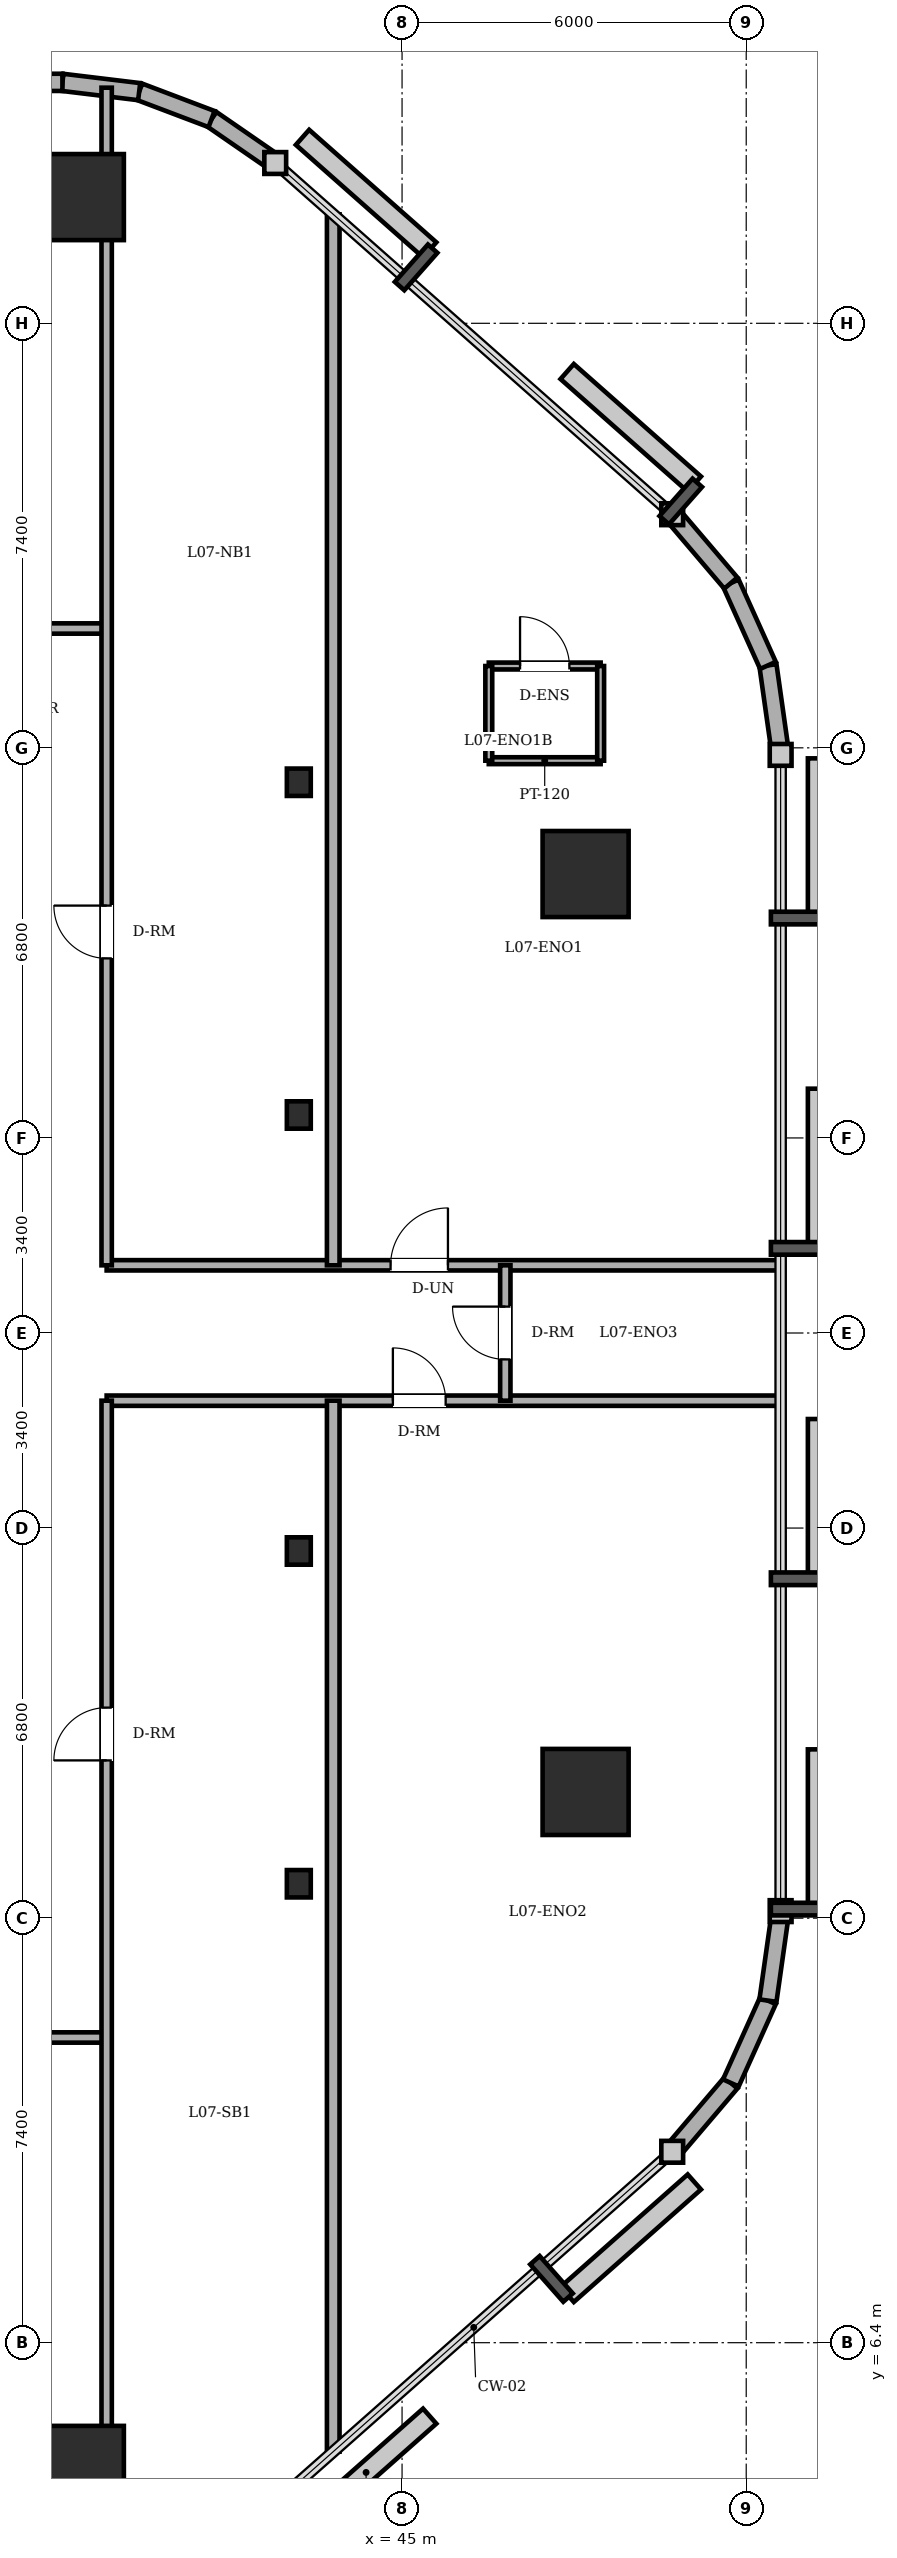
"""IFC4 building model, lengths in metres.
Left out: names, types, materials, properties, quantities, classifications, styles, units other than length and angle.
Written with IfcOpenShell. Run it as: python <this file> out.ifc"""

import sys

from ifc_helpers import new_model, si_unit, direction, frame, frame_2d, origin, origin_2d, place, context, subcontext, project, spatial, rectangle, circle, i_section, extrude, element, fill, save


model = new_model("IFC4")
c1 = context("Model", 3, precision=1e-05, world=origin(), true_north=direction((0.0, 1.0)))
c2 = subcontext(c1, "Body", "Model", "MODEL_VIEW")
j1 = project(units=[si_unit("LENGTHUNIT", "METRE"), si_unit("PLANEANGLEUNIT", "RADIAN")], contexts=[c1])
p1 = place(None, origin())
s1 = spatial("IfcSite", under=j1, at=p1, CompositionType="ELEMENT")
p2 = place(p1, origin())
s2 = spatial("IfcBuilding", under=s1, at=p2, CompositionType="ELEMENT")
p3 = place(p2, frame((0.0, 0.0, 28.8)))
s3 = spatial("IfcBuildingStorey", under=s2, at=p3, CompositionType="ELEMENT", Elevation=28.8)
for number, where, z_axis, x_axis in (
    (1, (39.4, 4.2, 0.0), (0.0, 0.0, 1.0), (1.0, 0.0, 0.0)),
    (2, (48.2, 16.0, 0.0), (0.0, 0.0, 1.0), (1.0, 0.0, 0.0)),
    (3, (48.2, 32.0, 0.0), (0.0, 0.0, 1.0), (1.0, 0.0, 0.0)),
    (4, (39.4, 43.8, 0.0), (0.0, 0.0, 1.0), (1.0, 0.0, 0.0)),
):
    element("IfcColumn", number, at=place(p3, frame(where, z_axis=z_axis, x_axis=x_axis)), inside=s3, PredefinedType="COLUMN", context=c2, shape_type="SweptSolid", body=[
        extrude(circle(Radius=0.75, at=origin_2d()), origin(), (0.0, 0.0, 1.0), 3.6),
    ])
for number, where, z_axis, x_axis in (
    (5, (43.2, 14.4, 0.0), (0.0, 0.0, 1.0), (1.0, 0.0, 0.0)),
    (6, (43.2, 20.2, 0.0), (0.0, 0.0, 1.0), (1.0, 0.0, 0.0)),
    (7, (43.2, 27.8, 0.0), (0.0, 0.0, 1.0), (1.0, 0.0, 0.0)),
    (8, (43.2, 33.6, 0.0), (0.0, 0.0, 1.0), (1.0, 0.0, 0.0)),
):
    element("IfcColumn", number, at=place(p3, frame(where, z_axis=z_axis, x_axis=x_axis)), inside=s3, PredefinedType="COLUMN", context=c2, shape_type="SweptSolid", body=[
        extrude(i_section(OverallWidth=0.417, OverallDepth=0.477, WebThickness=0.036, FlangeThickness=0.057, FilletRadius=0.015, at=origin_2d()), origin(), (0.0, 0.0, 1.0), 3.6),
    ])
p4 = place(p3, frame((49.71, 9.728, 0.0), z_axis=(0.0, 0.0, 1.0), x_axis=(0.648389989909, 0.7613083613, 0.0)))
e9 = element("IfcWall", 9, at=p4, inside=s3, PredefinedType="SOLIDWALL", context=c2, shape_type="SweptSolid", body=[
    extrude(rectangle(XDim=1.576, YDim=0.3, at=frame_2d((0.788, 0.0))), origin(), (0.0, 0.0, 1.0), 3.4),
])
p5 = place(p3, frame((50.732, 10.928, 0.0), z_axis=(0.0, 0.0, 1.0), x_axis=(0.410996558744, 0.911636895206, 0.0)))
e10 = element("IfcWall", 10, at=p5, inside=s3, PredefinedType="SOLIDWALL", context=c2, shape_type="SweptSolid", body=[
    extrude(rectangle(XDim=1.574, YDim=0.3, at=frame_2d((0.787, 0.0))), origin(), (0.0, 0.0, 1.0), 3.4),
])
for number, where, z_axis, x_axis in (
    (11, (51.379, 12.363, 0.0), (0.0, 0.0, 1.0), (0.14, 0.99, 0.0)),
    (12, (51.6, 34.077, 0.0), (0.0, 0.0, 1.0), (-0.14, 0.99, 0.0)),
):
    element("IfcWall", number, at=place(p3, frame(where, z_axis=z_axis, x_axis=x_axis)), inside=s3, PredefinedType="SOLIDWALL", context=c2, shape_type="SweptSolid", body=[
        extrude(rectangle(XDim=1.576, YDim=0.3, at=frame_2d((0.788, 0.0))), origin(), (0.0, 0.0, 1.0), 3.4),
    ])
p6 = place(p3, frame((51.379, 35.637, 0.0), z_axis=(0.0, 0.0, 1.0), x_axis=(-0.410996558744, 0.911636895206, 0.0)))
e13 = element("IfcWall", 13, at=p6, inside=s3, PredefinedType="SOLIDWALL", context=c2, shape_type="SweptSolid", body=[
    extrude(rectangle(XDim=1.574, YDim=0.3, at=frame_2d((0.787, 0.0))), origin(), (0.0, 0.0, 1.0), 3.4),
])
p7 = place(p3, frame((50.732, 37.072, 0.0), z_axis=(0.0, 0.0, 1.0), x_axis=(-0.648389989909, 0.7613083613, 0.0)))
e14 = element("IfcWall", 14, at=p7, inside=s3, PredefinedType="SOLIDWALL", context=c2, shape_type="SweptSolid", body=[
    extrude(rectangle(XDim=1.576, YDim=0.3, at=frame_2d((0.788, 0.0))), origin(), (0.0, 0.0, 1.0), 3.4),
])
p8 = place(p3, frame((42.789, 44.394, 0.0), z_axis=(0.0, 0.0, 1.0), x_axis=(-0.823116500192, 0.567872544777, 0.0)))
e15 = element("IfcWall", 15, at=p8, inside=s3, PredefinedType="SOLIDWALL", context=c2, shape_type="SweptSolid", body=[
    extrude(rectangle(XDim=1.349, YDim=0.3, at=frame_2d((0.674, 0.0))), origin(), (0.0, 0.0, 1.0), 3.4),
])
p9 = place(p3, frame((41.679, 45.16, 0.0), z_axis=(0.0, 0.0, 1.0), x_axis=(-0.935156721165, 0.354234254216, 0.0)))
e16 = element("IfcWall", 16, at=p9, inside=s3, PredefinedType="SOLIDWALL", context=c2, shape_type="SweptSolid", body=[
    extrude(rectangle(XDim=1.349, YDim=0.3, at=frame_2d((0.675, 0.0))), origin(), (0.0, 0.0, 1.0), 3.4),
])
p10 = place(p3, frame((40.417, 45.638, 0.0), z_axis=(0.0, 0.0, 1.0), x_axis=(-0.992739027259, 0.120288086515, 0.0)))
e17 = element("IfcWall", 17, at=p10, inside=s3, PredefinedType="SOLIDWALL", context=c2, shape_type="SweptSolid", body=[
    extrude(rectangle(XDim=1.348, YDim=0.3, at=frame_2d((0.674, 0.0))), origin(), (0.0, 0.0, 1.0), 3.4),
])
p11 = place(p3, frame((39.079, 45.8, 0.0), z_axis=(0.0, 0.0, 1.0), x_axis=(-1.0, 0.0, 0.0)))
e18 = element("IfcWall", 18, at=p11, inside=s3, PredefinedType="SOLIDWALL", context=c2, shape_type="SweptSolid", body=[
    extrude(rectangle(XDim=30.079, YDim=0.3, at=frame_2d((15.04, 0.0))), origin(), (0.0, 0.0, 1.0), 3.4),
])
p12 = place(p11, frame((25.279, 0.0, 0.0)))
e19 = element("IfcOpeningElement", 19, at=p12, cuts=e18, PredefinedType="OPENING", context=c2, shape_type="SweptSolid", body=[
    extrude(rectangle(XDim=0.95, YDim=2.2, at=frame_2d((0.475, 1.1))), frame((0.0, 0.16, 0.0), z_axis=(0.0, -1.0, 0.0), x_axis=(1.0, 0.0, 0.0)), (0.0, 0.0, 1.0), 0.32),
])
p13 = place(p11, frame((2.226, 0.0, 0.85)))
e20 = element("IfcOpeningElement", 20, at=p13, cuts=e18, PredefinedType="OPENING", context=c2, shape_type="SweptSolid", body=[
    extrude(rectangle(XDim=1.8, YDim=1.55, at=frame_2d((0.9, 0.775))), frame((0.0, 0.16, 0.0), z_axis=(0.0, -1.0, 0.0), x_axis=(1.0, 0.0, 0.0)), (0.0, 0.0, 1.0), 0.32),
])
p14 = place(p11, frame((5.003, 0.0, 0.85)))
e21 = element("IfcOpeningElement", 21, at=p14, cuts=e18, PredefinedType="OPENING", context=c2, shape_type="SweptSolid", body=[
    extrude(rectangle(XDim=1.8, YDim=1.55, at=frame_2d((0.9, 0.775))), frame((0.0, 0.16, 0.0), z_axis=(0.0, -1.0, 0.0), x_axis=(1.0, 0.0, 0.0)), (0.0, 0.0, 1.0), 0.32),
])
p15 = place(p11, frame((10.179, 0.0, 0.85)))
e22 = element("IfcOpeningElement", 22, at=p15, cuts=e18, PredefinedType="OPENING", context=c2, shape_type="SweptSolid", body=[
    extrude(rectangle(XDim=1.8, YDim=1.55, at=frame_2d((0.9, 0.775))), frame((0.0, 0.16, 0.0), z_axis=(0.0, -1.0, 0.0), x_axis=(1.0, 0.0, 0.0)), (0.0, 0.0, 1.0), 0.32),
])
p16 = place(p11, frame((12.579, 0.0, 0.85)))
e23 = element("IfcOpeningElement", 23, at=p16, cuts=e18, PredefinedType="OPENING", context=c2, shape_type="SweptSolid", body=[
    extrude(rectangle(XDim=1.8, YDim=1.55, at=frame_2d((0.9, 0.775))), frame((0.0, 0.16, 0.0), z_axis=(0.0, -1.0, 0.0), x_axis=(1.0, 0.0, 0.0)), (0.0, 0.0, 1.0), 0.32),
])
p17 = place(p11, frame((19.007, 0.0, 0.85)))
e24 = element("IfcOpeningElement", 24, at=p17, cuts=e18, PredefinedType="OPENING", context=c2, shape_type="SweptSolid", body=[
    extrude(rectangle(XDim=1.8, YDim=1.55, at=frame_2d((0.9, 0.775))), frame((0.0, 0.16, 0.0), z_axis=(0.0, -1.0, 0.0), x_axis=(1.0, 0.0, 0.0)), (0.0, 0.0, 1.0), 0.32),
])
p18 = place(p11, frame((23.034, 0.0, 0.85)))
e25 = element("IfcOpeningElement", 25, at=p18, cuts=e18, PredefinedType="OPENING", context=c2, shape_type="SweptSolid", body=[
    extrude(rectangle(XDim=1.8, YDim=1.55, at=frame_2d((0.9, 0.775))), frame((0.0, 0.16, 0.0), z_axis=(0.0, -1.0, 0.0), x_axis=(1.0, 0.0, 0.0)), (0.0, 0.0, 1.0), 0.32),
])
p19 = place(p3, frame((46.512, 35.626, 0.0), z_axis=(0.0, 0.0, 1.0), x_axis=(1.0, 0.0, 0.0)))
e26 = element("IfcWall", 26, at=p19, inside=s3, PredefinedType="PARTITIONING", context=c2, shape_type="SweptSolid", body=[
    extrude(rectangle(XDim=1.95, YDim=0.12, at=frame_2d((0.975, 0.0))), origin(), (0.0, 0.0, 1.0), 3.4),
])
p20 = place(p19, frame((0.545, 0.0, 0.0)))
e27 = element("IfcOpeningElement", 27, at=p20, cuts=e26, PredefinedType="OPENING", context=c2, shape_type="SweptSolid", body=[
    extrude(rectangle(XDim=0.86, YDim=2.1, at=frame_2d((0.43, 1.05))), frame((0.0, 0.07, 0.0), z_axis=(0.0, -1.0, 0.0), x_axis=(1.0, 0.0, 0.0)), (0.0, 0.0, 1.0), 0.14),
])
p21 = place(p3, frame((48.462, 33.976, 0.0), z_axis=(0.0, 0.0, 1.0), x_axis=(-1.0, 0.0, 0.0)))
e28 = element("IfcWall", 28, at=p21, inside=s3, PredefinedType="PARTITIONING", context=c2, shape_type="SweptSolid", body=[
    extrude(rectangle(XDim=1.95, YDim=0.12, at=frame_2d((0.975, 0.0))), origin(), (0.0, 0.0, 1.0), 3.4),
])
for number, where, z_axis, x_axis in (
    (29, (46.512, 35.626, 0.0), (0.0, 0.0, 1.0), (0.0, -1.0, 0.0)),
    (30, (48.462, 33.976, 0.0), (0.0, 0.0, 1.0), (0.0, 1.0, 0.0)),
):
    element("IfcWall", number, at=place(p3, frame(where, z_axis=z_axis, x_axis=x_axis)), inside=s3, PredefinedType="PARTITIONING", context=c2, shape_type="SweptSolid", body=[
        extrude(rectangle(XDim=1.65, YDim=0.12, at=frame_2d((0.825, 0.0))), origin(), (0.0, 0.0, 1.0), 3.4),
    ])
p22 = place(p3, frame((3.4, 11.72, 0.0), z_axis=(0.0, 0.0, 1.0), x_axis=(1.0, 0.0, 0.0)))
e31 = element("IfcWall", 31, at=p22, inside=s3, PredefinedType="PARTITIONING", context=c2, shape_type="SweptSolid", body=[
    extrude(rectangle(XDim=36.45, YDim=0.18, at=frame_2d((18.225, 0.0))), origin(), (0.0, 0.0, 1.0), 3.4),
])
p23 = place(p22, frame((21.24, 0.0, 0.0)))
e32 = element("IfcOpeningElement", 32, at=p23, cuts=e31, PredefinedType="OPENING", context=c2, shape_type="SweptSolid", body=[
    extrude(rectangle(XDim=0.92, YDim=2.1, at=frame_2d((0.46, 1.05))), frame((0.0, 0.1, 0.0), z_axis=(0.0, -1.0, 0.0), x_axis=(1.0, 0.0, 0.0)), (0.0, 0.0, 1.0), 0.2),
])
p24 = place(p22, frame((4.925, 0.0, 0.0)))
e33 = element("IfcOpeningElement", 33, at=p24, cuts=e31, PredefinedType="OPENING", context=c2, shape_type="SweptSolid", body=[
    extrude(rectangle(XDim=1.0, YDim=2.15, at=frame_2d((0.5, 1.075))), frame((0.0, 0.1, 0.0), z_axis=(0.0, -1.0, 0.0), x_axis=(1.0, 0.0, 0.0)), (0.0, 0.0, 1.0), 0.2),
])
p25 = place(p22, frame((13.525, 0.0, 0.0)))
e34 = element("IfcOpeningElement", 34, at=p25, cuts=e31, PredefinedType="OPENING", context=c2, shape_type="SweptSolid", body=[
    extrude(rectangle(XDim=1.0, YDim=2.15, at=frame_2d((0.5, 1.075))), frame((0.0, 0.1, 0.0), z_axis=(0.0, -1.0, 0.0), x_axis=(1.0, 0.0, 0.0)), (0.0, 0.0, 1.0), 0.2),
])
p26 = place(p22, frame((29.305, 0.0, 0.0)))
e35 = element("IfcOpeningElement", 35, at=p26, cuts=e31, PredefinedType="OPENING", context=c2, shape_type="SweptSolid", body=[
    extrude(rectangle(XDim=0.92, YDim=2.1, at=frame_2d((0.46, 1.05))), frame((0.0, 0.1, 0.0), z_axis=(0.0, -1.0, 0.0), x_axis=(1.0, 0.0, 0.0)), (0.0, 0.0, 1.0), 0.2),
])
p27 = place(p3, frame((39.85, 22.82, 0.0), z_axis=(0.0, 0.0, 1.0), x_axis=(1.0, 0.0, 0.0)))
e36 = element("IfcWall", 36, at=p27, inside=s3, PredefinedType="PARTITIONING", context=c2, shape_type="SweptSolid", body=[
    extrude(rectangle(XDim=11.75, YDim=0.18, at=frame_2d((5.875, 0.0))), origin(), (0.0, 0.0, 1.0), 3.4),
])
p28 = place(p27, frame((4.99, 0.0, 0.0)))
e37 = element("IfcOpeningElement", 37, at=p28, cuts=e36, PredefinedType="OPENING", context=c2, shape_type="SweptSolid", body=[
    extrude(rectangle(XDim=0.92, YDim=2.1, at=frame_2d((0.46, 1.05))), frame((0.0, 0.1, 0.0), z_axis=(0.0, -1.0, 0.0), x_axis=(1.0, 0.0, 0.0)), (0.0, 0.0, 1.0), 0.2),
])
p29 = place(p3, frame((39.85, 25.18, 0.0), z_axis=(0.0, 0.0, 1.0), x_axis=(1.0, 0.0, 0.0)))
e38 = element("IfcWall", 38, at=p29, inside=s3, PredefinedType="PARTITIONING", context=c2, shape_type="SweptSolid", body=[
    extrude(rectangle(XDim=11.75, YDim=0.18, at=frame_2d((5.875, 0.0))), origin(), (0.0, 0.0, 1.0), 3.4),
])
p30 = place(p29, frame((4.95, 0.0, 0.0)))
e39 = element("IfcOpeningElement", 39, at=p30, cuts=e38, PredefinedType="OPENING", context=c2, shape_type="SweptSolid", body=[
    extrude(rectangle(XDim=1.0, YDim=2.15, at=frame_2d((0.5, 1.075))), frame((0.0, 0.1, 0.0), z_axis=(0.0, -1.0, 0.0), x_axis=(1.0, 0.0, 0.0)), (0.0, 0.0, 1.0), 0.2),
])
p31 = place(p3, frame((3.4, 36.28, 0.0), z_axis=(0.0, 0.0, 1.0), x_axis=(1.0, 0.0, 0.0)))
e40 = element("IfcWall", 40, at=p31, inside=s3, PredefinedType="PARTITIONING", context=c2, shape_type="SweptSolid", body=[
    extrude(rectangle(XDim=36.45, YDim=0.18, at=frame_2d((18.225, 0.0))), origin(), (0.0, 0.0, 1.0), 3.4),
])
p32 = place(p31, frame((21.05, 0.0, 0.0)))
e41 = element("IfcOpeningElement", 41, at=p32, cuts=e40, PredefinedType="OPENING", context=c2, shape_type="SweptSolid", body=[
    extrude(rectangle(XDim=0.9, YDim=2.1, at=frame_2d((0.45, 1.05))), frame((0.0, 0.1, 0.0), z_axis=(0.0, -1.0, 0.0), x_axis=(1.0, 0.0, 0.0)), (0.0, 0.0, 1.0), 0.2),
])
p33 = place(p31, frame((24.67, 0.0, 0.0)))
e42 = element("IfcOpeningElement", 42, at=p33, cuts=e40, PredefinedType="OPENING", context=c2, shape_type="SweptSolid", body=[
    extrude(rectangle(XDim=0.86, YDim=2.1, at=frame_2d((0.43, 1.05))), frame((0.0, 0.1, 0.0), z_axis=(0.0, -1.0, 0.0), x_axis=(1.0, 0.0, 0.0)), (0.0, 0.0, 1.0), 0.2),
])
p34 = place(p31, frame((4.659, 0.0, 0.0)))
e43 = element("IfcOpeningElement", 43, at=p34, cuts=e40, PredefinedType="OPENING", context=c2, shape_type="SweptSolid", body=[
    extrude(rectangle(XDim=1.0, YDim=2.15, at=frame_2d((0.5, 1.075))), frame((0.0, 0.1, 0.0), z_axis=(0.0, -1.0, 0.0), x_axis=(1.0, 0.0, 0.0)), (0.0, 0.0, 1.0), 0.2),
])
p35 = place(p31, frame((13.258, 0.0, 0.0)))
e44 = element("IfcOpeningElement", 44, at=p35, cuts=e40, PredefinedType="OPENING", context=c2, shape_type="SweptSolid", body=[
    extrude(rectangle(XDim=1.0, YDim=2.15, at=frame_2d((0.5, 1.075))), frame((0.0, 0.1, 0.0), z_axis=(0.0, -1.0, 0.0), x_axis=(1.0, 0.0, 0.0)), (0.0, 0.0, 1.0), 0.2),
])
p36 = place(p31, frame((30.965, 0.0, 0.0)))
e45 = element("IfcOpeningElement", 45, at=p36, cuts=e40, PredefinedType="OPENING", context=c2, shape_type="SweptSolid", body=[
    extrude(rectangle(XDim=1.0, YDim=2.15, at=frame_2d((0.5, 1.075))), frame((0.0, 0.1, 0.0), z_axis=(0.0, -1.0, 0.0), x_axis=(1.0, 0.0, 0.0)), (0.0, 0.0, 1.0), 0.2),
])
p37 = place(p3, frame((39.85, 2.293, 0.0), z_axis=(0.0, 0.0, 1.0), x_axis=(0.0, 1.0, 0.0)))
e46 = element("IfcWall", 46, at=p37, inside=s3, PredefinedType="PARTITIONING", context=c2, shape_type="SweptSolid", body=[
    extrude(rectangle(XDim=20.527, YDim=0.18, at=frame_2d((10.264, 0.0))), origin(), (0.0, 0.0, 1.0), 2.782),
])
p38 = place(p37, frame((14.257, 0.0, 0.0)))
e47 = element("IfcOpeningElement", 47, at=p38, cuts=e46, PredefinedType="OPENING", context=c2, shape_type="SweptSolid", body=[
    extrude(rectangle(XDim=0.92, YDim=2.1, at=frame_2d((0.46, 1.05))), frame((0.0, 0.1, 0.0), z_axis=(0.0, -1.0, 0.0), x_axis=(1.0, 0.0, 0.0)), (0.0, 0.0, 1.0), 0.2),
])
p39 = place(p3, frame((39.85, 25.18, 0.0), z_axis=(0.0, 0.0, 1.0), x_axis=(0.0, 1.0, 0.0)))
e48 = element("IfcWall", 48, at=p39, inside=s3, PredefinedType="PARTITIONING", context=c2, shape_type="SweptSolid", body=[
    extrude(rectangle(XDim=20.527, YDim=0.18, at=frame_2d((10.264, 0.0))), origin(), (0.0, 0.0, 1.0), 2.782),
])
p40 = place(p39, frame((5.35, 0.0, 0.0)))
e49 = element("IfcOpeningElement", 49, at=p40, cuts=e48, PredefinedType="OPENING", context=c2, shape_type="SweptSolid", body=[
    extrude(rectangle(XDim=0.92, YDim=2.1, at=frame_2d((0.46, 1.05))), frame((0.0, 0.1, 0.0), z_axis=(0.0, -1.0, 0.0), x_axis=(1.0, 0.0, 0.0)), (0.0, 0.0, 1.0), 0.2),
])
for number, where, z_axis, x_axis in (
    (50, (43.8, 4.5, 0.0), (0.0, 0.0, 1.0), (0.0, 1.0, 0.0)),
    (51, (43.8, 25.18, 0.0), (0.0, 0.0, 1.0), (0.0, 1.0, 0.0)),
):
    element("IfcWall", number, at=place(p3, frame(where, z_axis=z_axis, x_axis=x_axis)), inside=s3, PredefinedType="PARTITIONING", context=c2, shape_type="SweptSolid", body=[
        extrude(rectangle(XDim=18.32, YDim=0.22, at=frame_2d((9.16, 0.0))), origin(), (0.0, 0.0, 1.0), 3.4),
    ])
p41 = place(p3, frame((46.8, 22.82, 0.0), z_axis=(0.0, 0.0, 1.0), x_axis=(0.0, 1.0, 0.0)))
e52 = element("IfcWall", 52, at=p41, inside=s3, PredefinedType="PARTITIONING", context=c2, shape_type="SweptSolid", body=[
    extrude(rectangle(XDim=2.36, YDim=0.18, at=frame_2d((1.18, 0.0))), origin(), (0.0, 0.0, 1.0), 3.4),
])
p42 = place(p41, frame((0.72, 0.0, 0.0)))
e53 = element("IfcOpeningElement", 53, at=p42, cuts=e52, PredefinedType="OPENING", context=c2, shape_type="SweptSolid", body=[
    extrude(rectangle(XDim=0.92, YDim=2.1, at=frame_2d((0.46, 1.05))), frame((0.0, 0.1, 0.0), z_axis=(0.0, -1.0, 0.0), x_axis=(1.0, 0.0, 0.0)), (0.0, 0.0, 1.0), 0.2),
])
p43 = place(p20, origin())
e54 = element("IfcDoor", 54, at=p43, inside=s3, OperationType="SINGLE_SWING_LEFT", PredefinedType="DOOR", context=c2, shape_type="SweptSolid", body=[
    extrude(rectangle(XDim=0.86, YDim=2.1, at=frame_2d((0.43, 1.05))), frame((0.0, 0.025, 0.0), z_axis=(0.0, -1.0, 0.0), x_axis=(1.0, 0.0, 0.0)), (0.0, 0.0, 1.0), 0.05),
])
fill(e27, e54)
p44 = place(p40, origin())
e55 = element("IfcDoor", 55, at=p44, inside=s3, OperationType="SINGLE_SWING_RIGHT", PredefinedType="DOOR", context=c2, shape_type="SweptSolid", body=[
    extrude(rectangle(XDim=0.92, YDim=2.1, at=frame_2d((0.46, 1.05))), frame((0.0, 0.025, 0.0), z_axis=(0.0, -1.0, 0.0), x_axis=(1.0, 0.0, 0.0)), (0.0, 0.0, 1.0), 0.05),
])
fill(e49, e55)
p45 = place(p38, origin())
e56 = element("IfcDoor", 56, at=p45, inside=s3, OperationType="SINGLE_SWING_LEFT", PredefinedType="DOOR", context=c2, shape_type="SweptSolid", body=[
    extrude(rectangle(XDim=0.92, YDim=2.1, at=frame_2d((0.46, 1.05))), frame((0.0, 0.025, 0.0), z_axis=(0.0, -1.0, 0.0), x_axis=(1.0, 0.0, 0.0)), (0.0, 0.0, 1.0), 0.05),
])
fill(e47, e56)
p46 = place(p30, origin())
e57 = element("IfcDoor", 57, at=p46, inside=s3, OperationType="SINGLE_SWING_RIGHT", PredefinedType="DOOR", context=c2, shape_type="SweptSolid", body=[
    extrude(rectangle(XDim=1.0, YDim=2.15, at=frame_2d((0.5, 1.075))), frame((0.0, 0.025, 0.0), z_axis=(0.0, -1.0, 0.0), x_axis=(1.0, 0.0, 0.0)), (0.0, 0.0, 1.0), 0.05),
])
fill(e39, e57)
p47 = place(p28, origin())
e58 = element("IfcDoor", 58, at=p47, inside=s3, OperationType="SINGLE_SWING_LEFT", PredefinedType="DOOR", context=c2, shape_type="SweptSolid", body=[
    extrude(rectangle(XDim=0.92, YDim=2.1, at=frame_2d((0.46, 1.05))), frame((0.0, 0.025, 0.0), z_axis=(0.0, -1.0, 0.0), x_axis=(1.0, 0.0, 0.0)), (0.0, 0.0, 1.0), 0.05),
])
fill(e37, e58)
p48 = place(p42, origin())
e59 = element("IfcDoor", 59, at=p48, inside=s3, OperationType="SINGLE_SWING_RIGHT", PredefinedType="DOOR", context=c2, shape_type="SweptSolid", body=[
    extrude(rectangle(XDim=0.92, YDim=2.1, at=frame_2d((0.46, 1.05))), frame((0.0, 0.025, 0.0), z_axis=(0.0, -1.0, 0.0), x_axis=(1.0, 0.0, 0.0)), (0.0, 0.0, 1.0), 0.05),
])
fill(e53, e59)
save(model, sys.argv[1])
